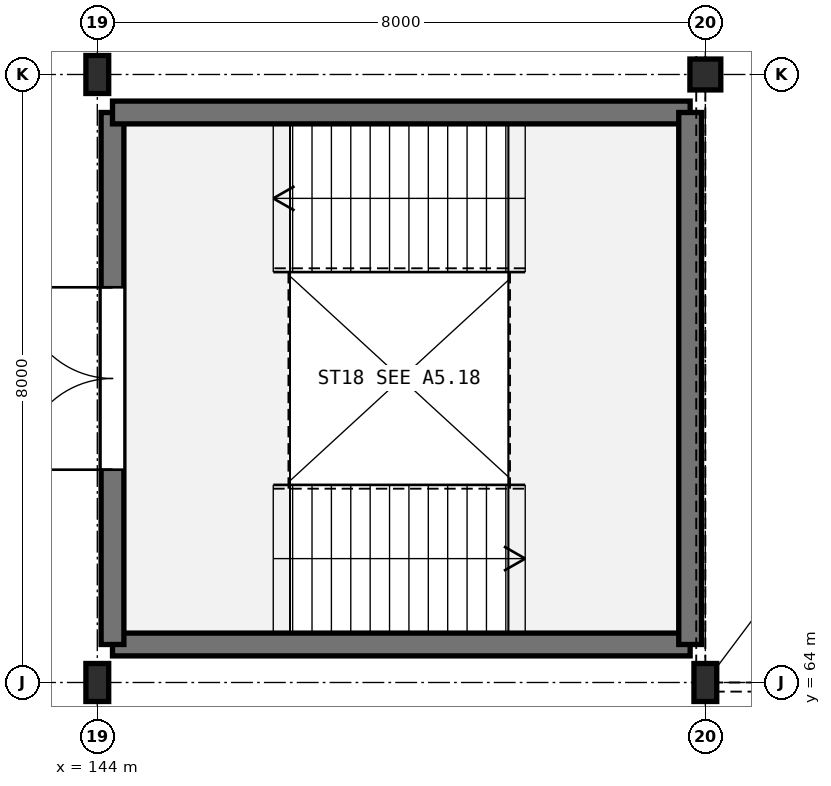
"""IFC4 building model, lengths in metres.
Left out: names, types, materials, properties, quantities, classifications, styles, units other than length and angle.
Written with IfcOpenShell. Run it as: python <this file> out.ifc"""

import sys

from ifc_helpers import new_model, si_unit, direction, frame, frame_2d, origin, origin_2d, place, context, subcontext, project, spatial, rectangle, hollow_circle, i_section, extrude, element, fill, save


model = new_model("IFC4")
c1 = context("Model", 3, precision=1e-05, world=origin(), true_north=direction((0.0, 1.0)))
c2 = subcontext(c1, "Body", "Model", "MODEL_VIEW")
j1 = project(units=[si_unit("LENGTHUNIT", "METRE"), si_unit("PLANEANGLEUNIT", "RADIAN")], contexts=[c1])
p1 = place(None, origin())
s1 = spatial("IfcSite", under=j1, at=p1, CompositionType="ELEMENT")
p2 = place(p1, origin())
s2 = spatial("IfcBuilding", under=s1, at=p2, CompositionType="ELEMENT")
p3 = place(p2, frame((0.0, 0.0, 5.4)))
s3 = spatial("IfcBuildingStorey", under=s2, at=p3, CompositionType="ELEMENT", Elevation=5.4)
for number, where, z_axis, x_axis in (
    (1, (144.0, 64.0, 0.0), (0.0, 0.0, 1.0), (1.0, 0.0, 0.0)),
    (2, (144.0, 72.0, 0.0), (0.0, 0.0, 1.0), (1.0, 0.0, 0.0)),
    (3, (152.0, 64.0, 0.0), (0.0, 0.0, 1.0), (1.0, 0.0, 0.0)),
):
    element("IfcColumn", number, at=place(p3, frame(where, z_axis=z_axis, x_axis=x_axis)), inside=s3, PredefinedType="COLUMN", context=c2, shape_type="SweptSolid", body=[
        extrude(i_section(OverallWidth=0.3, OverallDepth=0.5, WebThickness=0.014, FlangeThickness=0.028, FilletRadius=0.027, at=origin_2d()), origin(), (0.0, 0.0, 1.0), 4.8),
    ])
p4 = place(p3, frame((152.0, 72.0, 0.0), z_axis=(0.0, 0.0, 1.0), x_axis=(1.0, 0.0, 0.0)))
e4 = element("IfcColumn", 4, at=p4, inside=s3, PredefinedType="COLUMN", context=c2, shape_type="SweptSolid", body=[
    extrude(hollow_circle(Radius=0.203, WallThickness=0.02, at=origin_2d()), origin(), (0.0, 0.0, 1.0), 4.8),
])
p5 = place(p3, frame((151.8, 64.5, 0.0), z_axis=(0.0, 0.0, 1.0), x_axis=(-1.0, 0.0, 0.0)))
e5 = element("IfcWall", 5, at=p5, inside=s3, PredefinedType="SHEAR", context=c2, shape_type="SweptSolid", body=[
    extrude(rectangle(XDim=7.6, YDim=0.3, at=frame_2d((3.8, 0.0))), origin(), (0.0, 0.0, 1.0), 4.48),
])
p6 = place(p3, frame((144.2, 64.5, 0.0), z_axis=(0.0, 0.0, 1.0), x_axis=(0.0, 1.0, 0.0)))
e6 = element("IfcWall", 6, at=p6, inside=s3, PredefinedType="SHEAR", context=c2, shape_type="SweptSolid", body=[
    extrude(rectangle(XDim=7.0, YDim=0.3, at=frame_2d((3.5, 0.0))), origin(), (0.0, 0.0, 1.0), 4.48),
])
p7 = place(p6, frame((2.3, 0.0, 0.0)))
e7 = element("IfcOpeningElement", 7, at=p7, cuts=e6, PredefinedType="OPENING", context=c2, shape_type="SweptSolid", body=[
    extrude(rectangle(XDim=2.4, YDim=2.2, at=frame_2d((1.2, 1.1))), frame((0.0, 0.16, 0.0), z_axis=(0.0, -1.0, 0.0), x_axis=(1.0, 0.0, 0.0)), (0.0, 0.0, 1.0), 0.32),
])
p8 = place(p3, frame((144.2, 71.5, 0.0), z_axis=(0.0, 0.0, 1.0), x_axis=(1.0, 0.0, 0.0)))
e8 = element("IfcWall", 8, at=p8, inside=s3, PredefinedType="SHEAR", context=c2, shape_type="SweptSolid", body=[
    extrude(rectangle(XDim=7.6, YDim=0.3, at=frame_2d((3.8, 0.0))), origin(), (0.0, 0.0, 1.0), 4.48),
])
p9 = place(p3, frame((151.8, 71.5, 0.0), z_axis=(0.0, 0.0, 1.0), x_axis=(0.0, -1.0, 0.0)))
e9 = element("IfcWall", 9, at=p9, inside=s3, PredefinedType="SHEAR", context=c2, shape_type="SweptSolid", body=[
    extrude(rectangle(XDim=7.0, YDim=0.3, at=frame_2d((3.5, 0.0))), origin(), (0.0, 0.0, 1.0), 4.48),
])
p10 = place(p7, frame((2.4, 0.0, 0.0), z_axis=(0.0, 0.0, 1.0), x_axis=(-1.0, 0.0, 0.0)))
e10 = element("IfcDoor", 10, at=p10, inside=s3, OperationType="DOUBLE_DOOR_SINGLE_SWING", PredefinedType="DOOR", context=c2, shape_type="SweptSolid", body=[
    extrude(rectangle(XDim=2.4, YDim=2.2, at=frame_2d((1.2, 1.1))), frame((0.0, 0.025, 0.0), z_axis=(0.0, -1.0, 0.0), x_axis=(1.0, 0.0, 0.0)), (0.0, 0.0, 1.0), 0.05),
])
fill(e7, e10)
save(model, sys.argv[1])
